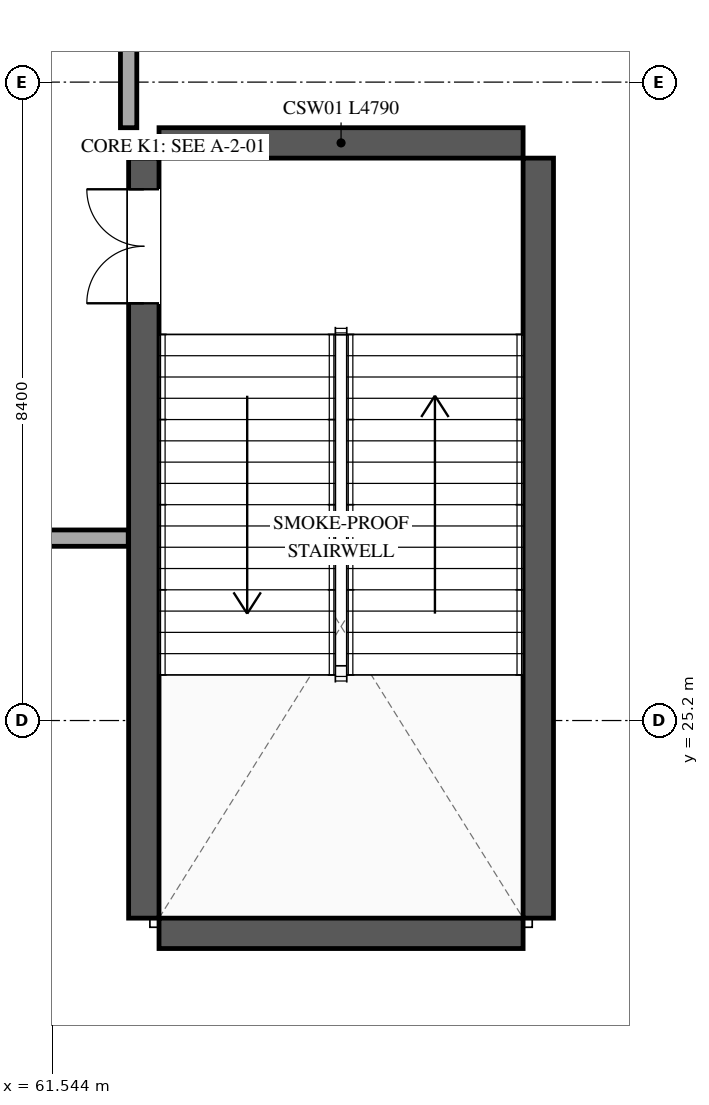
"""IFC4 building model, lengths in metres.
Left out: names, types, materials, properties, quantities, classifications, styles, units other than length and angle.
Written with IfcOpenShell. Run it as: python <this file> out.ifc"""

import sys

from ifc_helpers import new_model, si_unit, direction, frame, frame_2d, origin, place, context, subcontext, project, spatial, rectangle, extrude, element, fill, save


model = new_model("IFC4")
c1 = context("Model", 3, precision=1e-05, world=origin(), true_north=direction((0.0, 1.0)))
c2 = subcontext(c1, "Body", "Model", "MODEL_VIEW")
j1 = project(units=[si_unit("LENGTHUNIT", "METRE"), si_unit("PLANEANGLEUNIT", "RADIAN")], contexts=[c1])
p1 = place(None, origin())
s1 = spatial("IfcSite", under=j1, at=p1, CompositionType="ELEMENT")
p2 = place(p1, origin())
s2 = spatial("IfcBuilding", under=s1, at=p2, CompositionType="ELEMENT")
p3 = place(p2, frame((0.0, 0.0, 16.5)))
s3 = spatial("IfcBuildingStorey", under=s2, at=p3, CompositionType="ELEMENT", Elevation=16.5)
p4 = place(p3, frame((62.75, 22.6, 0.0), z_axis=(0.0, 0.0, 1.0), x_axis=(0.0, 1.0, 0.0)))
e1 = element("IfcWall", 1, at=p4, inside=s3, PredefinedType="SHEAR", context=c2, shape_type="SweptSolid", body=[
    extrude(rectangle(XDim=10.0, YDim=0.4, at=frame_2d((5.0, 0.0))), origin(), (0.0, 0.0, 1.0), 5.1),
])
p5 = place(p4, frame((8.09, 0.0, 0.0)))
e2 = element("IfcOpeningElement", 2, at=p5, cuts=e1, PredefinedType="OPENING", context=c2, shape_type="SweptSolid", body=[
    extrude(rectangle(XDim=1.5, YDim=2.2, at=frame_2d((0.75, 1.1))), frame((0.0, 0.21, 0.0), z_axis=(0.0, -1.0, 0.0), x_axis=(1.0, 0.0, 0.0)), (0.0, 0.0, 1.0), 0.42),
])
p6 = place(p3, frame((67.94, 32.6, 0.0), z_axis=(0.0, 0.0, 1.0), x_axis=(0.0, -1.0, 0.0)))
e3 = element("IfcWall", 3, at=p6, inside=s3, PredefinedType="SHEAR", context=c2, shape_type="SweptSolid", body=[
    extrude(rectangle(XDim=10.0, YDim=0.4, at=frame_2d((5.0, 0.0))), origin(), (0.0, 0.0, 1.0), 5.1),
])
for number, where, z_axis, x_axis in (
    (4, (67.74, 22.4, 0.0), (0.0, 0.0, 1.0), (-1.0, 0.0, 0.0)),
    (5, (62.95, 32.8, 0.0), (0.0, 0.0, 1.0), (1.0, 0.0, 0.0)),
):
    element("IfcWall", number, at=place(p3, frame(where, z_axis=z_axis, x_axis=x_axis)), inside=s3, PredefinedType="SHEAR", context=c2, shape_type="SweptSolid", body=[
        extrude(rectangle(XDim=4.79, YDim=0.4, at=frame_2d((2.395, 0.0))), origin(), (0.0, 0.0, 1.0), 5.1),
    ])
p7 = place(p3, frame((62.545, 27.6, 0.0), z_axis=(0.0, 0.0, 1.0), x_axis=(-1.0, 0.0, 0.0)))
e6 = element("IfcWall", 6, at=p7, inside=s3, PredefinedType="PARTITIONING", context=c2, shape_type="SweptSolid", body=[
    extrude(rectangle(XDim=5.745, YDim=0.215, at=frame_2d((2.873, 0.0))), origin(), (0.0, 0.0, 1.0), 4.06),
])
p8 = place(p3, frame((62.55, 35.0, 0.0), z_axis=(0.0, 0.0, 1.0), x_axis=(0.0, -1.0, 0.0)))
e7 = element("IfcWall", 7, at=p8, inside=s3, PredefinedType="PARTITIONING", context=c2, shape_type="SweptSolid", body=[
    extrude(rectangle(XDim=2.0, YDim=0.215, at=frame_2d((1.0, 0.0))), origin(), (0.0, 0.0, 1.0), 4.06),
])
p9 = place(p5, origin())
e8 = element("IfcDoor", 8, at=p9, inside=s3, OperationType="DOUBLE_DOOR_SINGLE_SWING", PredefinedType="DOOR", context=c2, shape_type="SweptSolid", body=[
    extrude(rectangle(XDim=1.5, YDim=2.2, at=frame_2d((0.75, 1.1))), frame((0.0, 0.025, 0.0), z_axis=(0.0, -1.0, 0.0), x_axis=(1.0, 0.0, 0.0)), (0.0, 0.0, 1.0), 0.05),
])
fill(e2, e8)
save(model, sys.argv[1])
